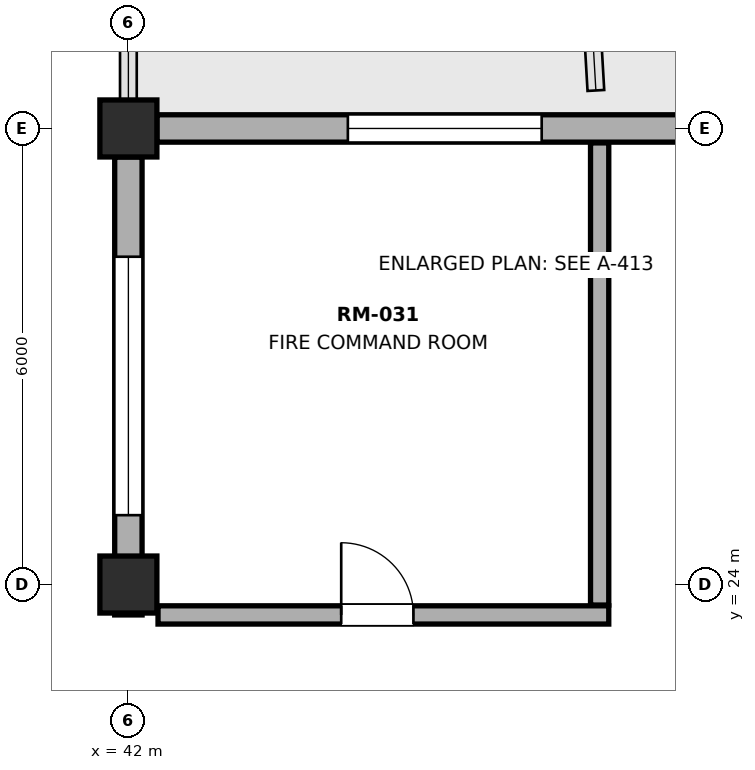
"""IFC4 building model, lengths in metres.
Left out: names, types, materials, properties, quantities, classifications, styles, units other than length and angle.
Written with IfcOpenShell. Run it as: python <this file> out.ifc"""

import sys

from ifc_helpers import new_model, si_unit, direction, frame, frame_2d, origin, origin_2d, place, context, subcontext, project, spatial, rectangle, extrude, element, fill, save


model = new_model("IFC4")
c1 = context("Model", 3, precision=1e-05, world=origin(), true_north=direction((0.0, 1.0)))
c2 = subcontext(c1, "Body", "Model", "MODEL_VIEW")
j1 = project(units=[si_unit("LENGTHUNIT", "METRE"), si_unit("PLANEANGLEUNIT", "RADIAN")], contexts=[c1])
p1 = place(None, origin())
s1 = spatial("IfcSite", under=j1, at=p1, CompositionType="ELEMENT")
p2 = place(p1, origin())
s2 = spatial("IfcBuilding", under=s1, at=p2, CompositionType="ELEMENT")
p3 = place(p2, origin())
s3 = spatial("IfcBuildingStorey", under=s2, at=p3, CompositionType="ELEMENT", Elevation=0.0)
for number, where, z_axis, x_axis in (
    (1, (42.0, 24.0, 0.0), (0.0, 0.0, 1.0), (1.0, 0.0, 0.0)),
    (2, (42.0, 30.0, 0.0), (0.0, 0.0, 1.0), (1.0, 0.0, 0.0)),
):
    element("IfcColumn", number, at=place(p3, frame(where, z_axis=z_axis, x_axis=x_axis)), inside=s3, PredefinedType="COLUMN", context=c2, shape_type="SweptSolid", body=[
        extrude(rectangle(XDim=0.75, YDim=0.75, at=origin_2d()), origin(), (0.0, 0.0, 1.0), 5.4),
    ])
p4 = place(p3, frame((42.0, 23.6, 0.0), z_axis=(0.0, 0.0, 1.0), x_axis=(0.0, 1.0, 0.0)))
e3 = element("IfcWall", 3, at=p4, inside=s3, PredefinedType="SOLIDWALL", context=c2, shape_type="SweptSolid", body=[
    extrude(rectangle(XDim=6.025, YDim=0.36, at=frame_2d((3.012, 0.0))), origin(), (0.0, 0.0, 1.0), 4.45),
])
p5 = place(p4, frame((1.312, 0.0, 0.95)))
e4 = element("IfcOpeningElement", 4, at=p5, cuts=e3, PredefinedType="OPENING", context=c2, shape_type="SweptSolid", body=[
    extrude(rectangle(XDim=3.4, YDim=2.0, at=frame_2d((1.7, 1.0))), frame((0.0, 0.19, 0.0), z_axis=(0.0, -1.0, 0.0), x_axis=(1.0, 0.0, 0.0)), (0.0, 0.0, 1.0), 0.38),
])
p6 = place(p3, frame((42.375, 30.0, 0.0), z_axis=(0.0, 0.0, 1.0), x_axis=(1.0, 0.0, 0.0)))
e5 = element("IfcWall", 5, at=p6, inside=s3, PredefinedType="SOLIDWALL", context=c2, shape_type="SweptSolid", body=[
    extrude(rectangle(XDim=7.575, YDim=0.36, at=frame_2d((3.788, 0.0))), origin(), (0.0, 0.0, 1.0), 4.35),
])
p7 = place(p6, frame((2.512, 0.0, 1.0)))
e6 = element("IfcOpeningElement", 6, at=p7, cuts=e5, PredefinedType="OPENING", context=c2, shape_type="SweptSolid", body=[
    extrude(rectangle(XDim=2.55, YDim=1.45, at=frame_2d((1.275, 0.725))), frame((0.0, 0.19, 0.0), z_axis=(0.0, -1.0, 0.0), x_axis=(1.0, 0.0, 0.0)), (0.0, 0.0, 1.0), 0.38),
])
p8 = place(p3, frame((48.2, 23.73, 0.0), z_axis=(0.0, 0.0, 1.0), x_axis=(0.0, 1.0, 0.0)))
e7 = element("IfcWall", 7, at=p8, inside=s3, PredefinedType="PARTITIONING", context=c2, shape_type="SweptSolid", body=[
    extrude(rectangle(XDim=6.08, YDim=0.24, at=frame_2d((3.04, 0.0))), origin(), (0.0, 0.0, 1.0), 5.09),
])
p9 = place(p3, frame((42.39, 23.6, 0.0), z_axis=(0.0, 0.0, 1.0), x_axis=(1.0, 0.0, 0.0)))
e8 = element("IfcWall", 8, at=p9, inside=s3, PredefinedType="PARTITIONING", context=c2, shape_type="SweptSolid", body=[
    extrude(rectangle(XDim=5.93, YDim=0.24, at=frame_2d((2.965, 0.0))), origin(), (0.0, 0.0, 1.0), 4.34),
])
p10 = place(p9, frame((2.41, 0.0, 0.0)))
e9 = element("IfcOpeningElement", 9, at=p10, cuts=e8, PredefinedType="OPENING", context=c2, shape_type="SweptSolid", body=[
    extrude(rectangle(XDim=0.95, YDim=2.1, at=frame_2d((0.475, 1.05))), frame((0.0, 0.13, 0.0), z_axis=(0.0, -1.0, 0.0), x_axis=(1.0, 0.0, 0.0)), (0.0, 0.0, 1.0), 0.26),
])
p11 = place(p5, origin())
e10 = element("IfcWindow", 10, at=p11, inside=s3, PartitioningType="SINGLE_PANEL", PredefinedType="WINDOW", context=c2, shape_type="SweptSolid", body=[
    extrude(rectangle(XDim=3.4, YDim=2.0, at=frame_2d((1.7, 1.0))), frame((0.0, 0.03, 0.0), z_axis=(0.0, -1.0, 0.0), x_axis=(1.0, 0.0, 0.0)), (0.0, 0.0, 1.0), 0.06),
])
fill(e4, e10)
p12 = place(p7, origin())
e11 = element("IfcWindow", 11, at=p12, inside=s3, PartitioningType="SINGLE_PANEL", PredefinedType="WINDOW", context=c2, shape_type="SweptSolid", body=[
    extrude(rectangle(XDim=2.55, YDim=1.45, at=frame_2d((1.275, 0.725))), frame((0.0, 0.03, 0.0), z_axis=(0.0, -1.0, 0.0), x_axis=(1.0, 0.0, 0.0)), (0.0, 0.0, 1.0), 0.06),
])
fill(e6, e11)
p13 = place(p10, origin())
e12 = element("IfcDoor", 12, at=p13, inside=s3, OperationType="SINGLE_SWING_LEFT", PredefinedType="DOOR", context=c2, shape_type="SweptSolid", body=[
    extrude(rectangle(XDim=0.95, YDim=2.1, at=frame_2d((0.475, 1.05))), frame((0.0, 0.025, 0.0), z_axis=(0.0, -1.0, 0.0), x_axis=(1.0, 0.0, 0.0)), (0.0, 0.0, 1.0), 0.05),
])
fill(e9, e12)
save(model, sys.argv[1])
